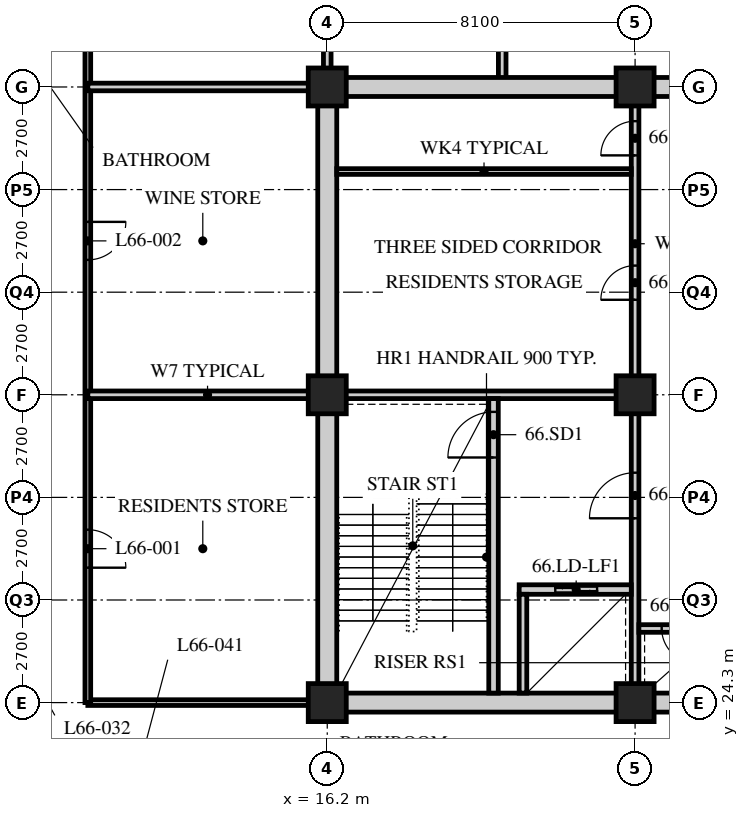
"""IFC4 building model, lengths in metres.
Left out: names, types, materials, properties, quantities, classifications, styles, units other than length and angle.
Written with IfcOpenShell. Run it as: python <this file> out.ifc"""

import sys

from ifc_helpers import new_model, si_unit, direction, frame, frame_2d, origin, origin_2d, place, context, subcontext, project, spatial, rectangle, hollow_rectangle, extrude, element, fill, save


model = new_model("IFC4")
c1 = context("Model", 3, precision=1e-05, world=origin(), true_north=direction((0.0, 1.0)))
c2 = subcontext(c1, "Body", "Model", "MODEL_VIEW")
j1 = project(units=[si_unit("LENGTHUNIT", "METRE"), si_unit("PLANEANGLEUNIT", "RADIAN")], contexts=[c1])
p1 = place(None, origin())
s1 = spatial("IfcSite", under=j1, at=p1, CompositionType="ELEMENT")
p2 = place(p1, origin())
s2 = spatial("IfcBuilding", under=s1, at=p2, CompositionType="ELEMENT")
p3 = place(p2, frame((0.0, 0.0, 258.0)))
s3 = spatial("IfcBuildingStorey", under=s2, at=p3, CompositionType="ELEMENT", Elevation=258.0)
for number, where, z_axis, x_axis in (
    (1, (16.2, 24.3, 0.0), (0.0, 0.0, 1.0), (1.0, 0.0, 0.0)),
    (2, (16.2, 32.4, 0.0), (0.0, 0.0, 1.0), (1.0, 0.0, 0.0)),
    (3, (16.2, 40.5, 0.0), (0.0, 0.0, 1.0), (1.0, 0.0, 0.0)),
    (4, (24.3, 24.3, 0.0), (0.0, 0.0, 1.0), (1.0, 0.0, 0.0)),
    (5, (24.3, 32.4, 0.0), (0.0, 0.0, 1.0), (1.0, 0.0, 0.0)),
    (6, (24.3, 40.5, 0.0), (0.0, 0.0, 1.0), (1.0, 0.0, 0.0)),
):
    element("IfcColumn", number, at=place(p3, frame(where, z_axis=z_axis, x_axis=x_axis)), inside=s3, PredefinedType="COLUMN", context=c2, shape_type="SweptSolid", body=[
        extrude(hollow_rectangle(XDim=1.0, YDim=1.0, WallThickness=0.1, at=origin_2d()), origin(), (0.0, 0.0, 1.0), 3.9),
    ])
p4 = place(p3, frame((16.0, 24.3, 0.0), z_axis=(0.0, 0.0, 1.0), x_axis=(-1.0, 0.0, 0.0)))
e7 = element("IfcWall", 7, at=p4, inside=s3, PredefinedType="PARTITIONING", context=c2, shape_type="SweptSolid", body=[
    extrude(rectangle(XDim=6.1, YDim=0.15, at=frame_2d((3.05, 0.0))), origin(), (0.0, 0.0, 1.0), 3.078),
])
p5 = place(p3, frame((9.9, 24.3, 0.0), z_axis=(0.0, 0.0, 1.0), x_axis=(0.0, 1.0, 0.0)))
e8 = element("IfcWall", 8, at=p5, inside=s3, PredefinedType="PARTITIONING", context=c2, shape_type="SweptSolid", body=[
    extrude(rectangle(XDim=22.5, YDim=0.15, at=frame_2d((11.25, 0.0))), origin(), (0.0, 0.0, 1.0), 3.69),
])
p6 = place(p5, frame((3.55, 0.0, 0.0)))
e9 = element("IfcOpeningElement", 9, at=p6, cuts=e8, PredefinedType="OPENING", context=c2, shape_type="SweptSolid", body=[
    extrude(rectangle(XDim=1.0, YDim=2.1, at=frame_2d((0.5, 1.05))), frame((0.0, 0.085, 0.0), z_axis=(0.0, -1.0, 0.0), x_axis=(1.0, 0.0, 0.0)), (0.0, 0.0, 1.0), 0.17),
])
p7 = place(p5, frame((11.65, 0.0, 0.0)))
e10 = element("IfcOpeningElement", 10, at=p7, cuts=e8, PredefinedType="OPENING", context=c2, shape_type="SweptSolid", body=[
    extrude(rectangle(XDim=1.0, YDim=2.1, at=frame_2d((0.5, 1.05))), frame((0.0, 0.085, 0.0), z_axis=(0.0, -1.0, 0.0), x_axis=(1.0, 0.0, 0.0)), (0.0, 0.0, 1.0), 0.17),
])
for number, where, z_axis, x_axis in (
    (11, (9.9, 32.4, 0.0), (0.0, 0.0, 1.0), (1.0, 0.0, 0.0)),
    (12, (16.2, 40.5, 0.0), (0.0, 0.0, 1.0), (0.0, 1.0, 0.0)),
):
    element("IfcWall", number, at=place(p3, frame(where, z_axis=z_axis, x_axis=x_axis)), inside=s3, PredefinedType="SOLIDWALL", context=c2, shape_type="SweptSolid", body=[
        extrude(rectangle(XDim=6.3, YDim=0.2, at=frame_2d((3.15, 0.0))), origin(), (0.0, 0.0, 1.0), 3.078),
    ])
p8 = place(p3, frame((20.803, 46.8, 0.0), z_axis=(0.0, 0.0, 1.0), x_axis=(0.0, -1.0, 0.0)))
e13 = element("IfcWall", 13, at=p8, inside=s3, PredefinedType="SOLIDWALL", context=c2, shape_type="SweptSolid", body=[
    extrude(rectangle(XDim=6.3, YDim=0.2, at=frame_2d((3.15, 0.0))), origin(), (0.0, 0.0, 1.0), 3.69),
])
p9 = place(p3, frame((9.9, 40.5, 0.0), z_axis=(0.0, 0.0, 1.0), x_axis=(1.0, 0.0, 0.0)))
e14 = element("IfcWall", 14, at=p9, inside=s3, PredefinedType="SOLIDWALL", context=c2, shape_type="SweptSolid", body=[
    extrude(rectangle(XDim=6.3, YDim=0.2, at=frame_2d((3.15, 0.0))), origin(), (0.0, 0.0, 1.0), 3.078),
])
p10 = place(p3, frame((15.95, 24.3, 0.0), z_axis=(0.0, 0.0, 1.0), x_axis=(1.0, 0.0, 0.0)))
e15 = element("IfcWall", 15, at=p10, inside=s3, PredefinedType="SOLIDWALL", context=c2, shape_type="SweptSolid", body=[
    extrude(rectangle(XDim=24.55, YDim=0.5, at=frame_2d((12.275, 0.0))), origin(), (0.0, 0.0, 1.0), 3.04),
])
p11 = place(p10, frame((11.5, 0.0, 0.0)))
e16 = element("IfcOpeningElement", 16, at=p11, cuts=e15, PredefinedType="OPENING", context=c2, shape_type="SweptSolid", body=[
    extrude(rectangle(XDim=1.8, YDim=2.4, at=frame_2d((0.9, 1.2))), frame((0.0, 0.26, 0.0), z_axis=(0.0, -1.0, 0.0), x_axis=(1.0, 0.0, 0.0)), (0.0, 0.0, 1.0), 0.52),
])
p12 = place(p3, frame((15.95, 40.5, 0.0), z_axis=(0.0, 0.0, 1.0), x_axis=(1.0, 0.0, 0.0)))
e17 = element("IfcWall", 17, at=p12, inside=s3, PredefinedType="SOLIDWALL", context=c2, shape_type="SweptSolid", body=[
    extrude(rectangle(XDim=24.55, YDim=0.5, at=frame_2d((12.275, 0.0))), origin(), (0.0, 0.0, 1.0), 3.04),
])
p13 = place(p12, frame((11.5, 0.0, 0.0)))
e18 = element("IfcOpeningElement", 18, at=p13, cuts=e17, PredefinedType="OPENING", context=c2, shape_type="SweptSolid", body=[
    extrude(rectangle(XDim=1.8, YDim=2.4, at=frame_2d((0.9, 1.2))), frame((0.0, 0.26, 0.0), z_axis=(0.0, -1.0, 0.0), x_axis=(1.0, 0.0, 0.0)), (0.0, 0.0, 1.0), 0.52),
])
p14 = place(p3, frame((16.2, 24.55, 0.0), z_axis=(0.0, 0.0, 1.0), x_axis=(0.0, 1.0, 0.0)))
e19 = element("IfcWall", 19, at=p14, inside=s3, PredefinedType="SOLIDWALL", context=c2, shape_type="SweptSolid", body=[
    extrude(rectangle(XDim=15.7, YDim=0.5, at=frame_2d((7.85, 0.0))), origin(), (0.0, 0.0, 1.0), 3.078),
])
p15 = place(p3, frame((16.45, 32.4, 0.0), z_axis=(0.0, 0.0, 1.0), x_axis=(1.0, 0.0, 0.0)))
e20 = element("IfcWall", 20, at=p15, inside=s3, PredefinedType="SOLIDWALL", context=c2, shape_type="SweptSolid", body=[
    extrude(rectangle(XDim=7.95, YDim=0.2, at=frame_2d((3.975, 0.0))), origin(), (0.0, 0.0, 1.0), 3.078),
])
p16 = place(p3, frame((24.3, 24.55, 0.0), z_axis=(0.0, 0.0, 1.0), x_axis=(0.0, 1.0, 0.0)))
e21 = element("IfcWall", 21, at=p16, inside=s3, PredefinedType="SOLIDWALL", context=c2, shape_type="SweptSolid", body=[
    extrude(rectangle(XDim=7.75, YDim=0.2, at=frame_2d((3.875, 0.0))), origin(), (0.0, 0.0, 1.0), 3.078),
])
p17 = place(p16, frame((4.6, 0.0, 0.0)))
e22 = element("IfcOpeningElement", 22, at=p17, cuts=e21, PredefinedType="OPENING", context=c2, shape_type="SweptSolid", body=[
    extrude(rectangle(XDim=1.2, YDim=2.1, at=frame_2d((0.6, 1.05))), frame((0.0, 0.11, 0.0), z_axis=(0.0, -1.0, 0.0), x_axis=(1.0, 0.0, 0.0)), (0.0, 0.0, 1.0), 0.22),
])
p18 = place(p3, frame((20.575, 24.55, 0.0), z_axis=(0.0, 0.0, 1.0), x_axis=(0.0, 1.0, 0.0)))
e23 = element("IfcWall", 23, at=p18, inside=s3, PredefinedType="SOLIDWALL", context=c2, shape_type="SweptSolid", body=[
    extrude(rectangle(XDim=7.75, YDim=0.25, at=frame_2d((3.875, 0.0))), origin(), (0.0, 0.0, 1.0), 3.69),
])
p19 = place(p18, frame((6.2, 0.0, 0.0)))
e24 = element("IfcOpeningElement", 24, at=p19, cuts=e23, PredefinedType="OPENING", context=c2, shape_type="SweptSolid", body=[
    extrude(rectangle(XDim=1.2, YDim=2.1, at=frame_2d((0.6, 1.05))), frame((0.0, 0.135, 0.0), z_axis=(0.0, -1.0, 0.0), x_axis=(1.0, 0.0, 0.0)), (0.0, 0.0, 1.0), 0.27),
])
p20 = place(p3, frame((21.25, 27.275, 0.0), z_axis=(0.0, 0.0, 1.0), x_axis=(1.0, 0.0, 0.0)))
e25 = element("IfcWall", 25, at=p20, inside=s3, PredefinedType="SOLIDWALL", context=c2, shape_type="SweptSolid", body=[
    extrude(rectangle(XDim=2.95, YDim=0.25, at=frame_2d((1.475, 0.0))), origin(), (0.0, 0.0, 1.0), 3.69),
])
p21 = place(p20, frame((0.95, 0.0, 0.0)))
e26 = element("IfcOpeningElement", 26, at=p21, cuts=e25, PredefinedType="OPENING", context=c2, shape_type="SweptSolid", body=[
    extrude(rectangle(XDim=1.1, YDim=2.4, at=frame_2d((0.55, 1.2))), frame((0.0, 0.135, 0.0), z_axis=(0.0, -1.0, 0.0), x_axis=(1.0, 0.0, 0.0)), (0.0, 0.0, 1.0), 0.27),
])
p22 = place(p3, frame((21.35, 24.55, 0.0), z_axis=(0.0, 0.0, 1.0), x_axis=(0.0, 1.0, 0.0)))
e27 = element("IfcWall", 27, at=p22, inside=s3, PredefinedType="SOLIDWALL", context=c2, shape_type="SweptSolid", body=[
    extrude(rectangle(XDim=2.6, YDim=0.2, at=frame_2d((1.3, 0.0))), origin(), (0.0, 0.0, 1.0), 3.69),
])
p23 = place(p3, frame((24.4, 26.25, 0.0), z_axis=(0.0, 0.0, 1.0), x_axis=(1.0, 0.0, 0.0)))
e28 = element("IfcWall", 28, at=p23, inside=s3, PredefinedType="SOLIDWALL", context=c2, shape_type="SweptSolid", body=[
    extrude(rectangle(XDim=2.15, YDim=0.2, at=frame_2d((1.075, 0.0))), origin(), (0.0, 0.0, 1.0), 3.69),
])
p24 = place(p23, frame((0.6, 0.0, 0.0)))
e29 = element("IfcOpeningElement", 29, at=p24, cuts=e28, PredefinedType="OPENING", context=c2, shape_type="SweptSolid", body=[
    extrude(rectangle(XDim=0.9, YDim=2.1, at=frame_2d((0.45, 1.05))), frame((0.0, 0.11, 0.0), z_axis=(0.0, -1.0, 0.0), x_axis=(1.0, 0.0, 0.0)), (0.0, 0.0, 1.0), 0.22),
])
p25 = place(p3, frame((24.3, 32.5, 0.0), z_axis=(0.0, 0.0, 1.0), x_axis=(0.0, 1.0, 0.0)))
e30 = element("IfcWall", 30, at=p25, inside=s3, PredefinedType="PARTITIONING", context=c2, shape_type="SweptSolid", body=[
    extrude(rectangle(XDim=7.75, YDim=0.2, at=frame_2d((3.875, 0.0))), origin(), (0.0, 0.0, 1.0), 3.078),
])
p26 = place(p25, frame((2.4, 0.0, 0.0)))
e31 = element("IfcOpeningElement", 31, at=p26, cuts=e30, PredefinedType="OPENING", context=c2, shape_type="SweptSolid", body=[
    extrude(rectangle(XDim=0.9, YDim=2.1, at=frame_2d((0.45, 1.05))), frame((0.0, 0.11, 0.0), z_axis=(0.0, -1.0, 0.0), x_axis=(1.0, 0.0, 0.0)), (0.0, 0.0, 1.0), 0.22),
])
p27 = place(p25, frame((6.2, 0.0, 0.0)))
e32 = element("IfcOpeningElement", 32, at=p27, cuts=e30, PredefinedType="OPENING", context=c2, shape_type="SweptSolid", body=[
    extrude(rectangle(XDim=0.9, YDim=2.1, at=frame_2d((0.45, 1.05))), frame((0.0, 0.11, 0.0), z_axis=(0.0, -1.0, 0.0), x_axis=(1.0, 0.0, 0.0)), (0.0, 0.0, 1.0), 0.22),
])
p28 = place(p3, frame((16.45, 38.275, 0.0), z_axis=(0.0, 0.0, 1.0), x_axis=(1.0, 0.0, 0.0)))
e33 = element("IfcWall", 33, at=p28, inside=s3, PredefinedType="PARTITIONING", context=c2, shape_type="SweptSolid", body=[
    extrude(rectangle(XDim=7.75, YDim=0.15, at=frame_2d((3.875, 0.0))), origin(), (0.0, 0.0, 1.0), 3.69),
])
p29 = place(p6, origin())
e34 = element("IfcDoor", 34, at=p29, inside=s3, OperationType="SINGLE_SWING_RIGHT", PredefinedType="DOOR", context=c2, shape_type="SweptSolid", body=[
    extrude(rectangle(XDim=1.0, YDim=2.1, at=frame_2d((0.5, 1.05))), frame((0.0, 0.025, 0.0), z_axis=(0.0, -1.0, 0.0), x_axis=(1.0, 0.0, 0.0)), (0.0, 0.0, 1.0), 0.05),
])
fill(e9, e34)
p30 = place(p7, origin())
e35 = element("IfcDoor", 35, at=p30, inside=s3, OperationType="SINGLE_SWING_LEFT", PredefinedType="DOOR", context=c2, shape_type="SweptSolid", body=[
    extrude(rectangle(XDim=1.0, YDim=2.1, at=frame_2d((0.5, 1.05))), frame((0.0, 0.025, 0.0), z_axis=(0.0, -1.0, 0.0), x_axis=(1.0, 0.0, 0.0)), (0.0, 0.0, 1.0), 0.05),
])
fill(e10, e35)
p31 = place(p26, origin())
e36 = element("IfcDoor", 36, at=p31, inside=s3, OperationType="SINGLE_SWING_LEFT", PredefinedType="DOOR", context=c2, shape_type="SweptSolid", body=[
    extrude(rectangle(XDim=0.9, YDim=2.1, at=frame_2d((0.45, 1.05))), frame((0.0, 0.025, 0.0), z_axis=(0.0, -1.0, 0.0), x_axis=(1.0, 0.0, 0.0)), (0.0, 0.0, 1.0), 0.05),
])
fill(e31, e36)
p32 = place(p27, origin())
e37 = element("IfcDoor", 37, at=p32, inside=s3, OperationType="SINGLE_SWING_LEFT", PredefinedType="DOOR", context=c2, shape_type="SweptSolid", body=[
    extrude(rectangle(XDim=0.9, YDim=2.1, at=frame_2d((0.45, 1.05))), frame((0.0, 0.025, 0.0), z_axis=(0.0, -1.0, 0.0), x_axis=(1.0, 0.0, 0.0)), (0.0, 0.0, 1.0), 0.05),
])
fill(e32, e37)
p33 = place(p19, origin())
e38 = element("IfcDoor", 38, at=p33, inside=s3, OperationType="SINGLE_SWING_LEFT", PredefinedType="DOOR", context=c2, shape_type="SweptSolid", body=[
    extrude(rectangle(XDim=1.2, YDim=2.1, at=frame_2d((0.6, 1.05))), frame((0.0, 0.025, 0.0), z_axis=(0.0, -1.0, 0.0), x_axis=(1.0, 0.0, 0.0)), (0.0, 0.0, 1.0), 0.05),
])
fill(e24, e38)
p34 = place(p17, origin())
e39 = element("IfcDoor", 39, at=p34, inside=s3, OperationType="SINGLE_SWING_LEFT", PredefinedType="DOOR", context=c2, shape_type="SweptSolid", body=[
    extrude(rectangle(XDim=1.2, YDim=2.1, at=frame_2d((0.6, 1.05))), frame((0.0, 0.025, 0.0), z_axis=(0.0, -1.0, 0.0), x_axis=(1.0, 0.0, 0.0)), (0.0, 0.0, 1.0), 0.05),
])
fill(e22, e39)
p35 = place(p24, origin())
e40 = element("IfcDoor", 40, at=p35, inside=s3, OperationType="SINGLE_SWING_LEFT", PredefinedType="DOOR", context=c2, shape_type="SweptSolid", body=[
    extrude(rectangle(XDim=0.9, YDim=2.1, at=frame_2d((0.45, 1.05))), frame((0.0, 0.025, 0.0), z_axis=(0.0, -1.0, 0.0), x_axis=(1.0, 0.0, 0.0)), (0.0, 0.0, 1.0), 0.05),
])
fill(e29, e40)
p36 = place(p21, origin())
e41 = element("IfcDoor", 41, at=p36, inside=s3, OperationType="DOUBLE_DOOR_SLIDING", PredefinedType="DOOR", context=c2, shape_type="SweptSolid", body=[
    extrude(rectangle(XDim=1.1, YDim=2.4, at=frame_2d((0.55, 1.2))), frame((0.0, 0.025, 0.0), z_axis=(0.0, -1.0, 0.0), x_axis=(1.0, 0.0, 0.0)), (0.0, 0.0, 1.0), 0.05),
])
fill(e26, e41)
save(model, sys.argv[1])
